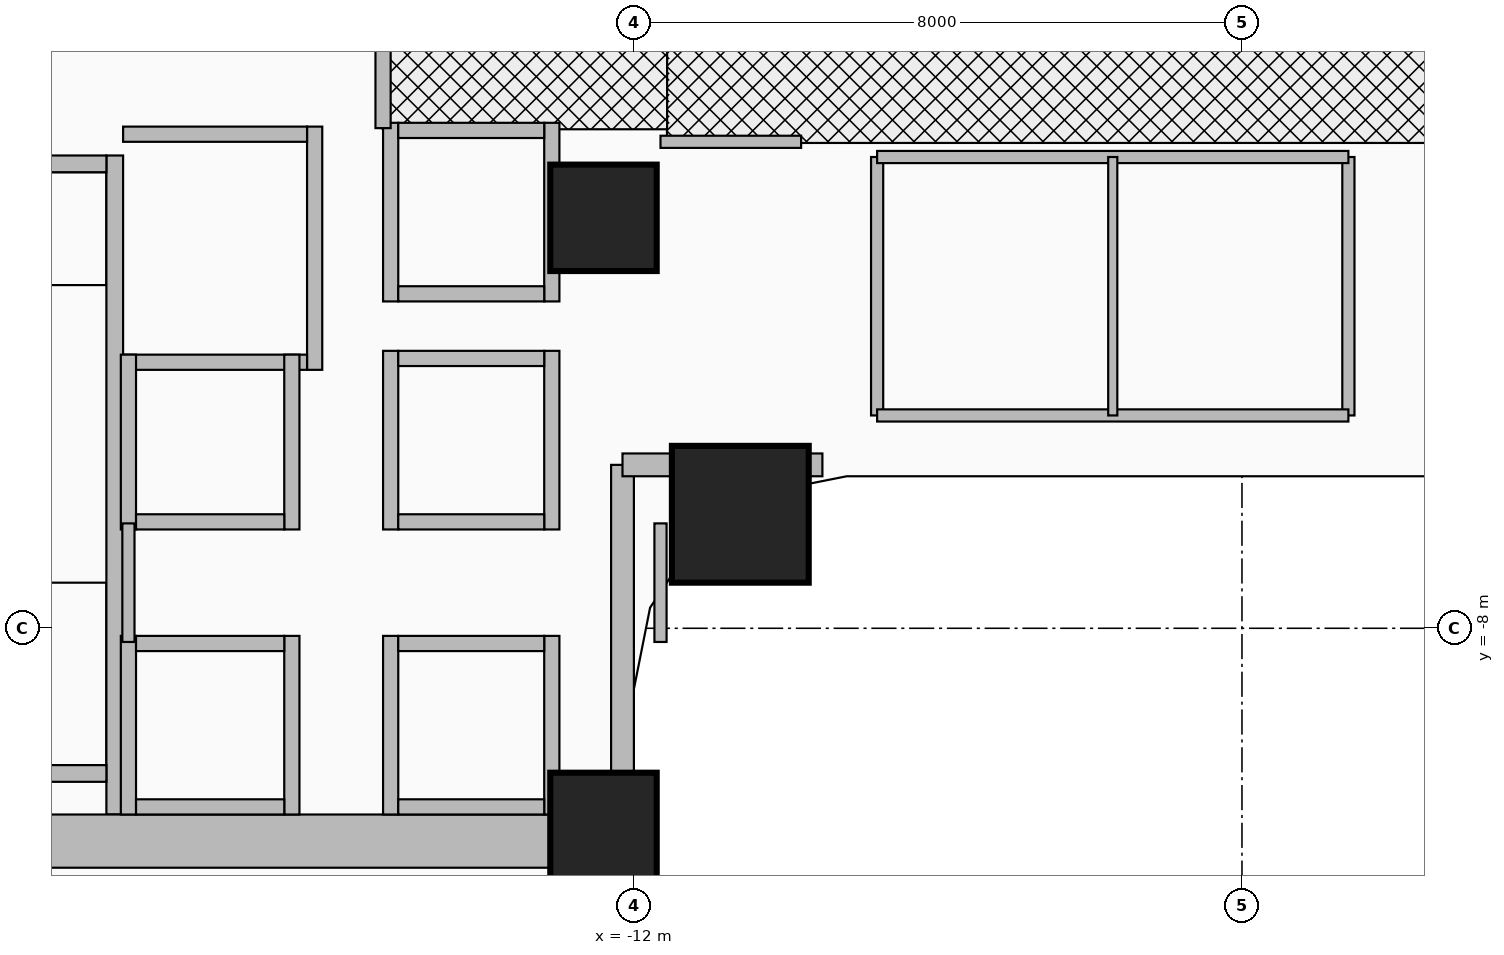
"""IFC4 building model, lengths in metres.
Left out: names, types, materials, properties, quantities, classifications, styles, units other than length and angle.
Written with IfcOpenShell. Run it as: python <this file> out.ifc"""

import sys

from ifc_helpers import new_model, si_unit, direction, frame, frame_2d, origin, origin_2d, place, context, subcontext, project, spatial, rectangle, extrude, source, transform, mapped, element, fill, save


model = new_model("IFC4")
c1 = context("Model", 3, precision=1e-05, world=origin(), true_north=direction((0.0, 1.0)))
c2 = subcontext(c1, "Body", "Model", "MODEL_VIEW")
j1 = project(units=[si_unit("LENGTHUNIT", "METRE"), si_unit("PLANEANGLEUNIT", "RADIAN")], contexts=[c1])
p1 = place(None, origin())
s1 = spatial("IfcSite", under=j1, at=p1, CompositionType="ELEMENT")
p2 = place(p1, origin())
s2 = spatial("IfcBuilding", under=s1, at=p2, CompositionType="ELEMENT")
p3 = place(p2, frame((0.0, 0.0, 10.4)))
s3 = spatial("IfcBuildingStorey", under=s2, at=p3, CompositionType="ELEMENT", Elevation=10.4)
p4 = place(p3, frame((-18.83, -10.45, 0.0), z_axis=(0.0, 0.0, 1.0), x_axis=(0.0, 1.0, 0.0)))
e1 = element("IfcWall", 1, at=p4, inside=s3, PredefinedType="SHEAR", context=c2, shape_type="SweptSolid", body=[
    extrude(rectangle(XDim=8.67, YDim=0.22, at=frame_2d((4.335, 0.0))), origin(), (0.0, 0.0, 1.0), 4.92),
])
p5 = place(p3, frame((-22.05, -9.91, 0.0), z_axis=(0.0, 0.0, 1.0), x_axis=(1.0, 0.0, 0.0)))
e2 = element("IfcWall", 2, at=p5, inside=s3, PredefinedType="SHEAR", context=c2, shape_type="SweptSolid", body=[
    extrude(rectangle(XDim=3.11, YDim=0.22, at=frame_2d((1.555, 0.0))), origin(), (0.0, 0.0, 1.0), 4.92),
])
p6 = place(p3, frame((-22.05, -1.89, 0.0), z_axis=(0.0, 0.0, 1.0), x_axis=(1.0, 0.0, 0.0)))
e3 = element("IfcWall", 3, at=p6, inside=s3, PredefinedType="SHEAR", context=c2, shape_type="SweptSolid", body=[
    extrude(rectangle(XDim=3.11, YDim=0.22, at=frame_2d((1.555, 0.0))), origin(), (0.0, 0.0, 1.0), 4.92),
])
p7 = place(p6, frame((1.0, 0.0, 0.0)))
e4 = element("IfcOpeningElement", 4, at=p7, cuts=e3, PredefinedType="OPENING", context=c2, shape_type="SweptSolid", body=[
    extrude(rectangle(XDim=1.1, YDim=2.15, at=frame_2d((0.55, 1.075))), frame((0.0, 0.125, 0.0), z_axis=(0.0, -1.0, 0.0), x_axis=(1.0, 0.0, 0.0)), (0.0, 0.0, 1.0), 0.25),
])
p8 = place(p3, frame((-22.65, -10.8, 0.0), z_axis=(0.0, 0.0, 1.0), x_axis=(1.0, 0.0, 0.0)))
e5 = element("IfcWall", 5, at=p8, inside=s3, PredefinedType="SHEAR", context=c2, shape_type="SweptSolid", body=[
    extrude(rectangle(XDim=10.25, YDim=0.7, at=frame_2d((5.125, 0.0))), origin(), (0.0, 0.0, 1.0), 4.92),
])
m1 = source(origin(), c2, "Body", "SweptSolid", [
    extrude(rectangle(XDim=1.4, YDim=1.4, at=origin_2d()), origin(), (0.0, 0.0, 1.0), 5.2),
])
for number, where, z_axis, x_axis in (
    (6, (-12.4, -10.6, 0.0), (0.0, 0.0, 1.0), (1.0, 0.0, 0.0)),
    (7, (-12.4, -2.6, 0.0), (0.0, 0.0, 1.0), (1.0, 0.0, 0.0)),
):
    element("IfcColumn", number, at=place(p3, frame(where, z_axis=z_axis, x_axis=x_axis)), inside=s3, PredefinedType="COLUMN", context=c2, shape_type="MappedRepresentation", body=[
        mapped(m1, transform((0.0, 0.0, 0.0), x_axis=(1.0, 0.0, 0.0), y_axis=(0.0, 1.0, 0.0), z_axis=(0.0, 0.0, 1.0), scale=1.0)),
    ])
m2 = source(origin(), c2, "Body", "SweptSolid", [
    extrude(rectangle(XDim=1.8, YDim=1.8, at=origin_2d()), origin(), (0.0, 0.0, 1.0), 5.2),
])
p9 = place(p3, frame((-10.6, -6.5, 0.0), z_axis=(0.0, 0.0, 1.0), x_axis=(1.0, 0.0, 0.0)))
e8 = element("IfcColumn", 8, at=p9, inside=s3, PredefinedType="COLUMN", context=c2, shape_type="MappedRepresentation", body=[
    mapped(m2, transform((0.0, 0.0, 0.0), x_axis=(1.0, 0.0, 0.0), y_axis=(0.0, 1.0, 0.0), z_axis=(0.0, 0.0, 1.0), scale=1.0)),
])
p10 = place(p3, frame((-12.15, -22.85, 0.0), z_axis=(0.0, 0.0, 1.0), x_axis=(0.0, 1.0, 0.0)))
e9 = element("IfcWall", 9, at=p10, inside=s3, PredefinedType="SOLIDWALL", context=c2, shape_type="SweptSolid", body=[
    extrude(rectangle(XDim=17.0, YDim=0.3, at=frame_2d((8.5, 0.0))), origin(), (0.0, 0.0, 1.0), 3.957),
])
p11 = place(p3, frame((-12.15, -5.85, 0.0), z_axis=(0.0, 0.0, 1.0), x_axis=(1.0, 0.0, 0.0)))
e10 = element("IfcWall", 10, at=p11, inside=s3, PredefinedType="SOLIDWALL", context=c2, shape_type="SweptSolid", body=[
    extrude(rectangle(XDim=2.63, YDim=0.3, at=frame_2d((1.315, 0.0))), origin(), (0.0, 0.0, 1.0), 4.92),
])
p12 = place(p3, frame((-16.2, -4.6, 0.0), z_axis=(0.0, 0.0, 1.0), x_axis=(0.0, 1.0, 0.0)))
e11 = element("IfcWall", 11, at=p12, inside=s3, PredefinedType="MOVABLE", context=c2, shape_type="SweptSolid", body=[
    extrude(rectangle(XDim=3.2, YDim=0.2, at=frame_2d((1.6, 0.0))), origin(), (0.0, 0.0, 1.0), 4.92),
])
p13 = place(p3, frame((-18.72, -4.5, 0.0), z_axis=(0.0, 0.0, 1.0), x_axis=(1.0, 0.0, 0.0)))
e12 = element("IfcWall", 12, at=p13, inside=s3, PredefinedType="MOVABLE", context=c2, shape_type="SweptSolid", body=[
    extrude(rectangle(XDim=2.42, YDim=0.2, at=frame_2d((1.21, 0.0))), origin(), (0.0, 0.0, 1.0), 4.92),
])
p14 = place(p3, frame((-18.72, -1.5, 0.0), z_axis=(0.0, 0.0, 1.0), x_axis=(1.0, 0.0, 0.0)))
e13 = element("IfcWall", 13, at=p14, inside=s3, PredefinedType="MOVABLE", context=c2, shape_type="SweptSolid", body=[
    extrude(rectangle(XDim=2.42, YDim=0.2, at=frame_2d((1.21, 0.0))), origin(), (0.0, 0.0, 1.0), 4.92),
])
p15 = place(p14, frame((0.61, 0.0, 0.0)))
e14 = element("IfcOpeningElement", 14, at=p15, cuts=e13, PredefinedType="OPENING", context=c2, shape_type="SweptSolid", body=[
    extrude(rectangle(XDim=1.2, YDim=2.1, at=frame_2d((0.6, 1.05))), frame((0.0, 0.115, 0.0), z_axis=(0.0, -1.0, 0.0), x_axis=(1.0, 0.0, 0.0)), (0.0, 0.0, 1.0), 0.23),
])
for number, where, z_axis, x_axis in (
    (15, (-15.2, -10.45, 0.0), (0.0, 0.0, 1.0), (0.0, 1.0, 0.0)),
    (16, (-13.08, -10.45, 0.0), (0.0, 0.0, 1.0), (0.0, 1.0, 0.0)),
):
    element("IfcWall", number, at=place(p3, frame(where, z_axis=z_axis, x_axis=x_axis)), inside=s3, PredefinedType="MOVABLE", context=c2, shape_type="SweptSolid", body=[
        extrude(rectangle(XDim=2.35, YDim=0.2, at=frame_2d((1.175, 0.0))), origin(), (0.0, 0.0, 1.0), 3.957),
    ])
p16 = place(p3, frame((-15.1, -10.35, 0.0), z_axis=(0.0, 0.0, 1.0), x_axis=(1.0, 0.0, 0.0)))
e17 = element("IfcWall", 17, at=p16, inside=s3, PredefinedType="MOVABLE", context=c2, shape_type="SweptSolid", body=[
    extrude(rectangle(XDim=1.92, YDim=0.2, at=frame_2d((0.96, 0.0))), origin(), (0.0, 0.0, 1.0), 3.957),
])
p17 = place(p3, frame((-15.1, -8.2, 0.0), z_axis=(0.0, 0.0, 1.0), x_axis=(1.0, 0.0, 0.0)))
e18 = element("IfcWall", 18, at=p17, inside=s3, PredefinedType="MOVABLE", context=c2, shape_type="SweptSolid", body=[
    extrude(rectangle(XDim=1.92, YDim=0.2, at=frame_2d((0.96, 0.0))), origin(), (0.0, 0.0, 1.0), 4.92),
])
p18 = place(p17, frame((0.41, 0.0, 0.0)))
e19 = element("IfcOpeningElement", 19, at=p18, cuts=e18, PredefinedType="OPENING", context=c2, shape_type="SweptSolid", body=[
    extrude(rectangle(XDim=1.1, YDim=2.1, at=frame_2d((0.55, 1.05))), frame((0.0, 0.115, 0.0), z_axis=(0.0, -1.0, 0.0), x_axis=(1.0, 0.0, 0.0)), (0.0, 0.0, 1.0), 0.23),
])
for number, where, z_axis, x_axis in (
    (20, (-15.2, -6.7, 0.0), (0.0, 0.0, 1.0), (0.0, 1.0, 0.0)),
    (21, (-13.08, -6.7, 0.0), (0.0, 0.0, 1.0), (0.0, 1.0, 0.0)),
):
    element("IfcWall", number, at=place(p3, frame(where, z_axis=z_axis, x_axis=x_axis)), inside=s3, PredefinedType="MOVABLE", context=c2, shape_type="SweptSolid", body=[
        extrude(rectangle(XDim=2.35, YDim=0.2, at=frame_2d((1.175, 0.0))), origin(), (0.0, 0.0, 1.0), 4.92),
    ])
p19 = place(p3, frame((-15.1, -6.6, 0.0), z_axis=(0.0, 0.0, 1.0), x_axis=(1.0, 0.0, 0.0)))
e22 = element("IfcWall", 22, at=p19, inside=s3, PredefinedType="MOVABLE", context=c2, shape_type="SweptSolid", body=[
    extrude(rectangle(XDim=1.92, YDim=0.2, at=frame_2d((0.96, 0.0))), origin(), (0.0, 0.0, 1.0), 4.92),
])
p20 = place(p19, frame((0.41, 0.0, 0.0)))
e23 = element("IfcOpeningElement", 23, at=p20, cuts=e22, PredefinedType="OPENING", context=c2, shape_type="SweptSolid", body=[
    extrude(rectangle(XDim=1.1, YDim=2.1, at=frame_2d((0.55, 1.05))), frame((0.0, 0.115, 0.0), z_axis=(0.0, -1.0, 0.0), x_axis=(1.0, 0.0, 0.0)), (0.0, 0.0, 1.0), 0.23),
])
p21 = place(p3, frame((-15.1, -4.45, 0.0), z_axis=(0.0, 0.0, 1.0), x_axis=(1.0, 0.0, 0.0)))
e24 = element("IfcWall", 24, at=p21, inside=s3, PredefinedType="MOVABLE", context=c2, shape_type="SweptSolid", body=[
    extrude(rectangle(XDim=1.92, YDim=0.2, at=frame_2d((0.96, 0.0))), origin(), (0.0, 0.0, 1.0), 4.92),
])
for number, where, z_axis, x_axis in (
    (25, (-18.65, -10.45, 0.0), (0.0, 0.0, 1.0), (0.0, 1.0, 0.0)),
    (26, (-16.5, -10.45, 0.0), (0.0, 0.0, 1.0), (0.0, 1.0, 0.0)),
):
    element("IfcWall", number, at=place(p3, frame(where, z_axis=z_axis, x_axis=x_axis)), inside=s3, PredefinedType="MOVABLE", context=c2, shape_type="SweptSolid", body=[
        extrude(rectangle(XDim=2.35, YDim=0.2, at=frame_2d((1.175, 0.0))), origin(), (0.0, 0.0, 1.0), 3.957),
    ])
p22 = place(p3, frame((-18.55, -10.35, 0.0), z_axis=(0.0, 0.0, 1.0), x_axis=(1.0, 0.0, 0.0)))
e27 = element("IfcWall", 27, at=p22, inside=s3, PredefinedType="MOVABLE", context=c2, shape_type="SweptSolid", body=[
    extrude(rectangle(XDim=1.95, YDim=0.2, at=frame_2d((0.975, 0.0))), origin(), (0.0, 0.0, 1.0), 3.957),
])
p23 = place(p3, frame((-18.55, -8.2, 0.0), z_axis=(0.0, 0.0, 1.0), x_axis=(1.0, 0.0, 0.0)))
e28 = element("IfcWall", 28, at=p23, inside=s3, PredefinedType="MOVABLE", context=c2, shape_type="SweptSolid", body=[
    extrude(rectangle(XDim=1.95, YDim=0.2, at=frame_2d((0.975, 0.0))), origin(), (0.0, 0.0, 1.0), 4.92),
])
for number, where, z_axis, x_axis in (
    (29, (-18.65, -6.7, 0.0), (0.0, 0.0, 1.0), (0.0, 1.0, 0.0)),
    (30, (-16.5, -6.7, 0.0), (0.0, 0.0, 1.0), (0.0, 1.0, 0.0)),
):
    element("IfcWall", number, at=place(p3, frame(where, z_axis=z_axis, x_axis=x_axis)), inside=s3, PredefinedType="MOVABLE", context=c2, shape_type="SweptSolid", body=[
        extrude(rectangle(XDim=2.3, YDim=0.2, at=frame_2d((1.15, 0.0))), origin(), (0.0, 0.0, 1.0), 4.92),
    ])
p24 = place(p3, frame((-18.55, -6.6, 0.0), z_axis=(0.0, 0.0, 1.0), x_axis=(1.0, 0.0, 0.0)))
e31 = element("IfcWall", 31, at=p24, inside=s3, PredefinedType="MOVABLE", context=c2, shape_type="SweptSolid", body=[
    extrude(rectangle(XDim=1.95, YDim=0.2, at=frame_2d((0.975, 0.0))), origin(), (0.0, 0.0, 1.0), 4.92),
])
for number, where, z_axis, x_axis in (
    (32, (-15.2, -3.7, 0.0), (0.0, 0.0, 1.0), (0.0, 1.0, 0.0)),
    (33, (-13.08, -3.7, 0.0), (0.0, 0.0, 1.0), (0.0, 1.0, 0.0)),
):
    element("IfcWall", number, at=place(p3, frame(where, z_axis=z_axis, x_axis=x_axis)), inside=s3, PredefinedType="MOVABLE", context=c2, shape_type="SweptSolid", body=[
        extrude(rectangle(XDim=2.35, YDim=0.2, at=frame_2d((1.175, 0.0))), origin(), (0.0, 0.0, 1.0), 4.92),
    ])
for number, where, z_axis, x_axis in (
    (34, (-15.1, -3.6, 0.0), (0.0, 0.0, 1.0), (1.0, 0.0, 0.0)),
    (35, (-15.1, -1.45, 0.0), (0.0, 0.0, 1.0), (1.0, 0.0, 0.0)),
):
    element("IfcWall", number, at=place(p3, frame(where, z_axis=z_axis, x_axis=x_axis)), inside=s3, PredefinedType="MOVABLE", context=c2, shape_type="SweptSolid", body=[
        extrude(rectangle(XDim=1.92, YDim=0.2, at=frame_2d((0.96, 0.0))), origin(), (0.0, 0.0, 1.0), 4.92),
    ])
p25 = place(p3, frame((-15.3, -1.42, 0.0), z_axis=(0.0, 0.0, 1.0), x_axis=(0.0, 1.0, 0.0)))
e36 = element("IfcWall", 36, at=p25, inside=s3, PredefinedType="PARTITIONING", context=c2, shape_type="SweptSolid", body=[
    extrude(rectangle(XDim=2.67, YDim=0.2, at=frame_2d((1.335, 0.0))), origin(), (0.0, 0.0, 1.0), 4.92),
])
p26 = place(p25, frame((0.78, 0.0, 0.0)))
e37 = element("IfcOpeningElement", 37, at=p26, cuts=e36, PredefinedType="OPENING", context=c2, shape_type="SweptSolid", body=[
    extrude(rectangle(XDim=1.05, YDim=2.15, at=frame_2d((0.525, 1.075))), frame((0.0, 0.115, 0.0), z_axis=(0.0, -1.0, 0.0), x_axis=(1.0, 0.0, 0.0)), (0.0, 0.0, 1.0), 0.23),
])
p27 = place(p3, frame((-18.65, -8.18, 0.0), z_axis=(0.0, 0.0, 1.0), x_axis=(0.0, 1.0, 0.0)))
e38 = element("IfcWall", 38, at=p27, inside=s3, PredefinedType="PARTITIONING", context=c2, shape_type="SweptSolid", body=[
    extrude(rectangle(XDim=1.56, YDim=0.16, at=frame_2d((0.78, 0.0))), origin(), (0.0, 0.0, 1.0), 4.92),
])
p28 = place(p3, frame((-11.65, -8.18, 0.0), z_axis=(0.0, 0.0, 1.0), x_axis=(0.0, 1.0, 0.0)))
e39 = element("IfcWall", 39, at=p28, inside=s3, PredefinedType="PARTITIONING", context=c2, shape_type="SweptSolid", body=[
    extrude(rectangle(XDim=1.56, YDim=0.16, at=frame_2d((0.78, 0.0))), origin(), (0.0, 0.0, 1.0), 3.957),
])
for number, where, z_axis, x_axis in (
    (40, (-8.8, -5.2, 0.0), (0.0, 0.0, 1.0), (0.0, 1.0, 0.0)),
    (41, (-2.6, -5.2, 0.0), (0.0, 0.0, 1.0), (0.0, 1.0, 0.0)),
):
    element("IfcWall", number, at=place(p3, frame(where, z_axis=z_axis, x_axis=x_axis)), inside=s3, PredefinedType="PARTITIONING", context=c2, shape_type="SweptSolid", body=[
        extrude(rectangle(XDim=3.4, YDim=0.16, at=frame_2d((1.7, 0.0))), origin(), (0.0, 0.0, 1.0), 4.92),
    ])
p29 = place(p3, frame((-8.8, -5.2, 0.0), z_axis=(0.0, 0.0, 1.0), x_axis=(1.0, 0.0, 0.0)))
e42 = element("IfcWall", 42, at=p29, inside=s3, PredefinedType="PARTITIONING", context=c2, shape_type="SweptSolid", body=[
    extrude(rectangle(XDim=6.2, YDim=0.16, at=frame_2d((3.1, 0.0))), origin(), (0.0, 0.0, 1.0), 4.92),
])
p30 = place(p3, frame((-8.8, -1.8, 0.0), z_axis=(0.0, 0.0, 1.0), x_axis=(1.0, 0.0, 0.0)))
e43 = element("IfcWall", 43, at=p30, inside=s3, PredefinedType="PARTITIONING", context=c2, shape_type="SweptSolid", body=[
    extrude(rectangle(XDim=6.2, YDim=0.16, at=frame_2d((3.1, 0.0))), origin(), (0.0, 0.0, 1.0), 4.92),
])
p31 = place(p30, frame((0.3, 0.0, 0.0)))
e44 = element("IfcOpeningElement", 44, at=p31, cuts=e43, PredefinedType="OPENING", context=c2, shape_type="SweptSolid", body=[
    extrude(rectangle(XDim=0.85, YDim=2.1, at=frame_2d((0.425, 1.05))), frame((0.0, 0.095, 0.0), z_axis=(0.0, -1.0, 0.0), x_axis=(1.0, 0.0, 0.0)), (0.0, 0.0, 1.0), 0.19),
])
p32 = place(p30, frame((3.35, 0.0, 0.0)))
e45 = element("IfcOpeningElement", 45, at=p32, cuts=e43, PredefinedType="OPENING", context=c2, shape_type="SweptSolid", body=[
    extrude(rectangle(XDim=0.85, YDim=2.1, at=frame_2d((0.425, 1.05))), frame((0.0, 0.095, 0.0), z_axis=(0.0, -1.0, 0.0), x_axis=(1.0, 0.0, 0.0)), (0.0, 0.0, 1.0), 0.19),
])
p33 = place(p3, frame((-5.7, -5.2, 0.0), z_axis=(0.0, 0.0, 1.0), x_axis=(0.0, 1.0, 0.0)))
e46 = element("IfcWall", 46, at=p33, inside=s3, PredefinedType="PARTITIONING", context=c2, shape_type="SweptSolid", body=[
    extrude(rectangle(XDim=3.4, YDim=0.12, at=frame_2d((1.7, 0.0))), origin(), (0.0, 0.0, 1.0), 4.92),
])
p34 = place(p3, frame((-11.65, -1.6, 0.0), z_axis=(0.0, 0.0, 1.0), x_axis=(1.0, 0.0, 0.0)))
e47 = element("IfcWall", 47, at=p34, inside=s3, PredefinedType="PARTITIONING", context=c2, shape_type="SweptSolid", body=[
    extrude(rectangle(XDim=1.85, YDim=0.16, at=frame_2d((0.925, 0.0))), origin(), (0.0, 0.0, 1.0), 4.92),
])
p35 = place(p15, origin())
e48 = element("IfcDoor", 48, at=p35, inside=s3, OperationType="DOUBLE_DOOR_SLIDING", PredefinedType="DOOR", context=c2, shape_type="SweptSolid", body=[
    extrude(rectangle(XDim=1.2, YDim=2.1, at=frame_2d((0.6, 1.05))), frame((0.0, 0.025, 0.0), z_axis=(0.0, -1.0, 0.0), x_axis=(1.0, 0.0, 0.0)), (0.0, 0.0, 1.0), 0.05),
])
fill(e14, e48)
p36 = place(p18, origin())
e49 = element("IfcDoor", 49, at=p36, inside=s3, OperationType="DOUBLE_DOOR_SLIDING", PredefinedType="DOOR", context=c2, shape_type="SweptSolid", body=[
    extrude(rectangle(XDim=1.1, YDim=2.1, at=frame_2d((0.55, 1.05))), frame((0.0, 0.025, 0.0), z_axis=(0.0, -1.0, 0.0), x_axis=(1.0, 0.0, 0.0)), (0.0, 0.0, 1.0), 0.05),
])
fill(e19, e49)
p37 = place(p20, origin())
e50 = element("IfcDoor", 50, at=p37, inside=s3, OperationType="DOUBLE_DOOR_SLIDING", PredefinedType="DOOR", context=c2, shape_type="SweptSolid", body=[
    extrude(rectangle(XDim=1.1, YDim=2.1, at=frame_2d((0.55, 1.05))), frame((0.0, 0.025, 0.0), z_axis=(0.0, -1.0, 0.0), x_axis=(1.0, 0.0, 0.0)), (0.0, 0.0, 1.0), 0.05),
])
fill(e23, e50)
p38 = place(p26, origin())
e51 = element("IfcDoor", 51, at=p38, inside=s3, OperationType="SINGLE_SWING_RIGHT", PredefinedType="DOOR", context=c2, shape_type="SweptSolid", body=[
    extrude(rectangle(XDim=1.05, YDim=2.15, at=frame_2d((0.525, 1.075))), frame((0.0, 0.025, 0.0), z_axis=(0.0, -1.0, 0.0), x_axis=(1.0, 0.0, 0.0)), (0.0, 0.0, 1.0), 0.05),
])
fill(e37, e51)
p39 = place(p31, origin())
e52 = element("IfcDoor", 52, at=p39, inside=s3, OperationType="SINGLE_SWING_RIGHT", PredefinedType="DOOR", context=c2, shape_type="SweptSolid", body=[
    extrude(rectangle(XDim=0.85, YDim=2.1, at=frame_2d((0.425, 1.05))), frame((0.0, 0.025, 0.0), z_axis=(0.0, -1.0, 0.0), x_axis=(1.0, 0.0, 0.0)), (0.0, 0.0, 1.0), 0.05),
])
fill(e44, e52)
p40 = place(p32, origin())
e53 = element("IfcDoor", 53, at=p40, inside=s3, OperationType="SINGLE_SWING_LEFT", PredefinedType="DOOR", context=c2, shape_type="SweptSolid", body=[
    extrude(rectangle(XDim=0.85, YDim=2.1, at=frame_2d((0.425, 1.05))), frame((0.0, 0.025, 0.0), z_axis=(0.0, -1.0, 0.0), x_axis=(1.0, 0.0, 0.0)), (0.0, 0.0, 1.0), 0.05),
])
fill(e45, e53)
save(model, sys.argv[1])
